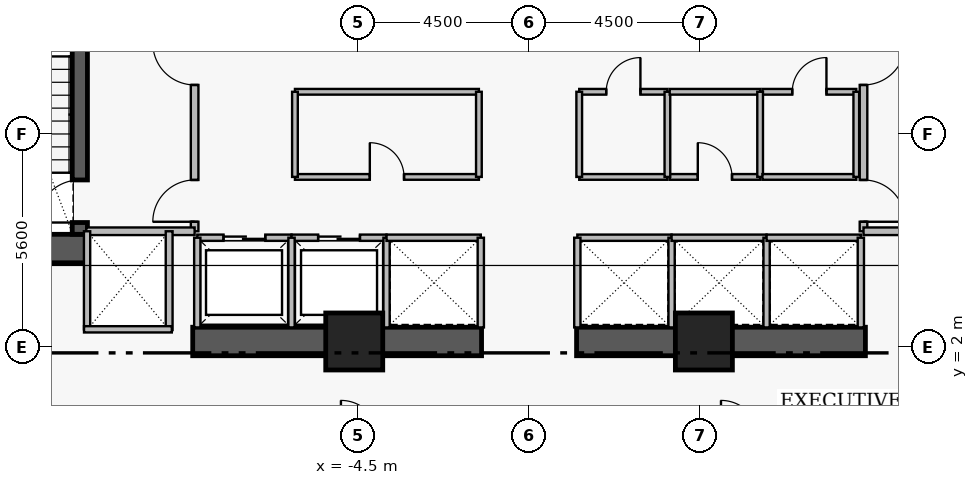
"""IFC4 building model, lengths in metres.
Left out: names, types, materials, properties, quantities, classifications, styles, units other than length and angle.
Written with IfcOpenShell. Run it as: python <this file> out.ifc"""

import sys

from ifc_helpers import new_model, si_unit, direction, frame, frame_2d, origin, origin_2d, place, context, subcontext, project, spatial, rectangle, extrude, element, fill, save


model = new_model("IFC4")
c1 = context("Model", 3, precision=1e-05, world=origin(), true_north=direction((0.0, 1.0)))
c2 = subcontext(c1, "Body", "Model", "MODEL_VIEW")
j1 = project(units=[si_unit("LENGTHUNIT", "METRE"), si_unit("PLANEANGLEUNIT", "RADIAN")], contexts=[c1])
p1 = place(None, origin())
s1 = spatial("IfcSite", under=j1, at=p1, CompositionType="ELEMENT")
p2 = place(p1, origin())
s2 = spatial("IfcBuilding", under=s1, at=p2, CompositionType="ELEMENT")
p3 = place(p2, frame((0.0, 0.0, 143.1)))
s3 = spatial("IfcBuildingStorey", under=s2, at=p3, CompositionType="ELEMENT", Elevation=143.1)
p4 = place(p3, frame((-16.16, 4.595, 0.0), z_axis=(0.0, 0.0, 1.0), x_axis=(1.0, 0.0, 0.0)))
e1 = element("IfcWall", 1, at=p4, inside=s3, PredefinedType="SHEAR", context=c2, shape_type="SweptSolid", body=[
    extrude(rectangle(XDim=4.56, YDim=0.75, at=frame_2d((2.28, 0.0))), origin(), (0.0, 0.0, 1.0), 3.46),
])
for number, where, z_axis, x_axis in (
    (2, (-8.85, 2.15, 0.0), (0.0, 0.0, 1.0), (1.0, 0.0, 0.0)),
    (3, (1.25, 2.15, 0.0), (0.0, 0.0, 1.0), (1.0, 0.0, 0.0)),
):
    element("IfcWall", number, at=place(p3, frame(where, z_axis=z_axis, x_axis=x_axis)), inside=s3, PredefinedType="SHEAR", context=c2, shape_type="SweptSolid", body=[
        extrude(rectangle(XDim=7.6, YDim=0.75, at=frame_2d((3.8, 0.0))), origin(), (0.0, 0.0, 1.0), 3.43),
    ])
p5 = place(p3, frame((-11.82, 4.97, 0.0), z_axis=(0.0, 0.0, 1.0), x_axis=(0.0, 1.0, 0.0)))
e4 = element("IfcWall", 4, at=p5, inside=s3, PredefinedType="SHEAR", context=c2, shape_type="SweptSolid", body=[
    extrude(rectangle(XDim=8.96, YDim=0.4, at=frame_2d((4.48, 0.0))), origin(), (0.0, 0.0, 1.0), 3.46),
])
p6 = place(p5, frame((0.31, 0.0, 0.0)))
e5 = element("IfcOpeningElement", 5, at=p6, cuts=e4, PredefinedType="OPENING", context=c2, shape_type="SweptSolid", body=[
    extrude(rectangle(XDim=1.12, YDim=2.22, at=frame_2d((0.56, 1.11))), frame((0.0, 0.21, 0.0), z_axis=(0.0, -1.0, 0.0), x_axis=(1.0, 0.0, 0.0)), (0.0, 0.0, 1.0), 0.42),
])
for number, where, z_axis, x_axis in (
    (6, (-4.6, 2.15, 0.0), (0.0, 0.0, 1.0), (1.0, 0.0, 0.0)),
    (7, (4.6, 2.15, 0.0), (0.0, 0.0, 1.0), (1.0, 0.0, 0.0)),
):
    element("IfcColumn", number, at=place(p3, frame(where, z_axis=z_axis, x_axis=x_axis)), inside=s3, PredefinedType="COLUMN", context=c2, shape_type="SweptSolid", body=[
        extrude(rectangle(XDim=1.5, YDim=1.5, at=origin_2d()), origin(), (0.0, 0.0, 1.0), 3.65),
    ])
p7 = place(p3, frame((-8.8, 5.05, 0.0), z_axis=(0.0, 0.0, 1.0), x_axis=(0.0, 1.0, 0.0)))
e8 = element("IfcWall", 8, at=p7, inside=s3, PredefinedType="PARTITIONING", context=c2, shape_type="SweptSolid", body=[
    extrude(rectangle(XDim=6.1, YDim=0.2, at=frame_2d((3.05, 0.0))), origin(), (0.0, 0.0, 1.0), 3.43),
])
p8 = place(p7, frame((0.25, 0.0, 0.0)))
e9 = element("IfcOpeningElement", 9, at=p8, cuts=e8, PredefinedType="OPENING", context=c2, shape_type="SweptSolid", body=[
    extrude(rectangle(XDim=1.1, YDim=2.2, at=frame_2d((0.55, 1.1))), frame((0.0, 0.11, 0.0), z_axis=(0.0, -1.0, 0.0), x_axis=(1.0, 0.0, 0.0)), (0.0, 0.0, 1.0), 0.22),
])
p9 = place(p7, frame((3.85, 0.0, 0.0)))
e10 = element("IfcOpeningElement", 10, at=p9, cuts=e8, PredefinedType="OPENING", context=c2, shape_type="SweptSolid", body=[
    extrude(rectangle(XDim=1.1, YDim=2.2, at=frame_2d((0.55, 1.1))), frame((0.0, 0.11, 0.0), z_axis=(0.0, -1.0, 0.0), x_axis=(1.0, 0.0, 0.0)), (0.0, 0.0, 1.0), 0.22),
])
p10 = place(p3, frame((8.8, 11.15, 0.0), z_axis=(0.0, 0.0, 1.0), x_axis=(0.0, -1.0, 0.0)))
e11 = element("IfcWall", 11, at=p10, inside=s3, PredefinedType="PARTITIONING", context=c2, shape_type="SweptSolid", body=[
    extrude(rectangle(XDim=6.1, YDim=0.2, at=frame_2d((3.05, 0.0))), origin(), (0.0, 0.0, 1.0), 3.43),
])
p11 = place(p10, frame((1.15, 0.0, 0.0)))
e12 = element("IfcOpeningElement", 12, at=p11, cuts=e11, PredefinedType="OPENING", context=c2, shape_type="SweptSolid", body=[
    extrude(rectangle(XDim=1.1, YDim=2.2, at=frame_2d((0.55, 1.1))), frame((0.0, 0.11, 0.0), z_axis=(0.0, -1.0, 0.0), x_axis=(1.0, 0.0, 0.0)), (0.0, 0.0, 1.0), 0.22),
])
p12 = place(p10, frame((4.75, 0.0, 0.0)))
e13 = element("IfcOpeningElement", 13, at=p12, cuts=e11, PredefinedType="OPENING", context=c2, shape_type="SweptSolid", body=[
    extrude(rectangle(XDim=1.1, YDim=2.2, at=frame_2d((0.55, 1.1))), frame((0.0, 0.11, 0.0), z_axis=(0.0, -1.0, 0.0), x_axis=(1.0, 0.0, 0.0)), (0.0, 0.0, 1.0), 0.22),
])
p13 = place(p3, frame((-8.73, 4.88, 0.0), z_axis=(0.0, 0.0, 1.0), x_axis=(1.0, 0.0, 0.0)))
e14 = element("IfcWall", 14, at=p13, inside=s3, PredefinedType="PARTITIONING", context=c2, shape_type="SweptSolid", body=[
    extrude(rectangle(XDim=2.48, YDim=0.165, at=frame_2d((1.24, 0.0))), origin(), (0.0, 0.0, 1.0), 3.43),
])
p14 = place(p13, frame((0.69, 0.0, 0.0)))
e15 = element("IfcOpeningElement", 15, at=p14, cuts=e14, PredefinedType="OPENING", context=c2, shape_type="SweptSolid", body=[
    extrude(rectangle(XDim=1.1, YDim=2.25, at=frame_2d((0.55, 1.125))), frame((0.0, 0.093, 0.0), z_axis=(0.0, -1.0, 0.0), x_axis=(1.0, 0.0, 0.0)), (0.0, 0.0, 1.0), 0.185),
])
p15 = place(p3, frame((-6.25, 4.88, 0.0), z_axis=(0.0, 0.0, 1.0), x_axis=(1.0, 0.0, 0.0)))
e16 = element("IfcWall", 16, at=p15, inside=s3, PredefinedType="PARTITIONING", context=c2, shape_type="SweptSolid", body=[
    extrude(rectangle(XDim=2.5, YDim=0.165, at=frame_2d((1.25, 0.0))), origin(), (0.0, 0.0, 1.0), 3.43),
])
p16 = place(p15, frame((0.7, 0.0, 0.0)))
e17 = element("IfcOpeningElement", 17, at=p16, cuts=e16, PredefinedType="OPENING", context=c2, shape_type="SweptSolid", body=[
    extrude(rectangle(XDim=1.1, YDim=2.25, at=frame_2d((0.55, 1.125))), frame((0.0, 0.093, 0.0), z_axis=(0.0, -1.0, 0.0), x_axis=(1.0, 0.0, 0.0)), (0.0, 0.0, 1.0), 0.185),
])
p17 = place(p3, frame((-6.16, 6.48, 0.0), z_axis=(0.0, 0.0, 1.0), x_axis=(1.0, 0.0, 0.0)))
e18 = element("IfcWall", 18, at=p17, inside=s3, PredefinedType="PARTITIONING", context=c2, shape_type="SweptSolid", body=[
    extrude(rectangle(XDim=4.84, YDim=0.15, at=frame_2d((2.42, 0.0))), origin(), (0.0, 0.0, 1.0), 3.43),
])
p18 = place(p17, frame((1.97, 0.0, 0.0)))
e19 = element("IfcOpeningElement", 19, at=p18, cuts=e18, PredefinedType="OPENING", context=c2, shape_type="SweptSolid", body=[
    extrude(rectangle(XDim=0.9, YDim=2.15, at=frame_2d((0.45, 1.075))), frame((0.0, 0.085, 0.0), z_axis=(0.0, -1.0, 0.0), x_axis=(1.0, 0.0, 0.0)), (0.0, 0.0, 1.0), 0.17),
])
p19 = place(p3, frame((1.32, 8.72, 0.0), z_axis=(0.0, 0.0, 1.0), x_axis=(1.0, 0.0, 0.0)))
e20 = element("IfcWall", 20, at=p19, inside=s3, PredefinedType="PARTITIONING", context=c2, shape_type="SweptSolid", body=[
    extrude(rectangle(XDim=2.32, YDim=0.15, at=frame_2d((1.16, 0.0))), origin(), (0.0, 0.0, 1.0), 3.43),
])
p20 = place(p19, frame((0.71, 0.0, 0.0)))
e21 = element("IfcOpeningElement", 21, at=p20, cuts=e20, PredefinedType="OPENING", context=c2, shape_type="SweptSolid", body=[
    extrude(rectangle(XDim=0.9, YDim=2.15, at=frame_2d((0.45, 1.075))), frame((0.0, 0.085, 0.0), z_axis=(0.0, -1.0, 0.0), x_axis=(1.0, 0.0, 0.0)), (0.0, 0.0, 1.0), 0.17),
])
p21 = place(p3, frame((3.7, 6.48, 0.0), z_axis=(0.0, 0.0, 1.0), x_axis=(1.0, 0.0, 0.0)))
e22 = element("IfcWall", 22, at=p21, inside=s3, PredefinedType="PARTITIONING", context=c2, shape_type="SweptSolid", body=[
    extrude(rectangle(XDim=2.38, YDim=0.15, at=frame_2d((1.19, 0.0))), origin(), (0.0, 0.0, 1.0), 3.43),
])
p22 = place(p21, frame((0.74, 0.0, 0.0)))
e23 = element("IfcOpeningElement", 23, at=p22, cuts=e22, PredefinedType="OPENING", context=c2, shape_type="SweptSolid", body=[
    extrude(rectangle(XDim=0.9, YDim=2.15, at=frame_2d((0.45, 1.075))), frame((0.0, 0.085, 0.0), z_axis=(0.0, -1.0, 0.0), x_axis=(1.0, 0.0, 0.0)), (0.0, 0.0, 1.0), 0.17),
])
p23 = place(p3, frame((6.14, 8.72, 0.0), z_axis=(0.0, 0.0, 1.0), x_axis=(1.0, 0.0, 0.0)))
e24 = element("IfcWall", 24, at=p23, inside=s3, PredefinedType="PARTITIONING", context=c2, shape_type="SweptSolid", body=[
    extrude(rectangle(XDim=2.47, YDim=0.15, at=frame_2d((1.235, 0.0))), origin(), (0.0, 0.0, 1.0), 3.43),
])
p24 = place(p23, frame((0.785, 0.0, 0.0)))
e25 = element("IfcOpeningElement", 25, at=p24, cuts=e24, PredefinedType="OPENING", context=c2, shape_type="SweptSolid", body=[
    extrude(rectangle(XDim=0.9, YDim=2.15, at=frame_2d((0.45, 1.075))), frame((0.0, 0.085, 0.0), z_axis=(0.0, -1.0, 0.0), x_axis=(1.0, 0.0, 0.0)), (0.0, 0.0, 1.0), 0.17),
])
for number, where, z_axis, x_axis in (
    (26, (-11.65, 5.05, 0.0), (0.0, 0.0, 1.0), (1.0, 0.0, 0.0)),
    (27, (8.8, 5.05, 0.0), (0.0, 0.0, 1.0), (1.0, 0.0, 0.0)),
):
    element("IfcWall", number, at=place(p3, frame(where, z_axis=z_axis, x_axis=x_axis)), inside=s3, PredefinedType="PARTITIONING", context=c2, shape_type="SweptSolid", body=[
        extrude(rectangle(XDim=2.85, YDim=0.2, at=frame_2d((1.425, 0.0))), origin(), (0.0, 0.0, 1.0), 3.43),
    ])
for number, where, z_axis, x_axis in (
    (28, (-8.73, 2.52, 0.0), (0.0, 0.0, 1.0), (0.0, 1.0, 0.0)),
    (29, (-6.25, 2.52, 0.0), (0.0, 0.0, 1.0), (0.0, 1.0, 0.0)),
    (30, (-3.75, 2.52, 0.0), (0.0, 0.0, 1.0), (0.0, 1.0, 0.0)),
):
    element("IfcWall", number, at=place(p3, frame(where, z_axis=z_axis, x_axis=x_axis)), inside=s3, PredefinedType="PARTITIONING", context=c2, shape_type="SweptSolid", body=[
        extrude(rectangle(XDim=2.36, YDim=0.165, at=frame_2d((1.18, 0.0))), origin(), (0.0, 0.0, 1.0), 3.43),
    ])
p25 = place(p3, frame((-3.75, 4.88, 0.0), z_axis=(0.0, 0.0, 1.0), x_axis=(1.0, 0.0, 0.0)))
e31 = element("IfcWall", 31, at=p25, inside=s3, PredefinedType="PARTITIONING", context=c2, shape_type="SweptSolid", body=[
    extrude(rectangle(XDim=2.48, YDim=0.165, at=frame_2d((1.24, 0.0))), origin(), (0.0, 0.0, 1.0), 3.43),
])
p26 = place(p3, frame((-1.27, 2.52, 0.0), z_axis=(0.0, 0.0, 1.0), x_axis=(0.0, 1.0, 0.0)))
e32 = element("IfcWall", 32, at=p26, inside=s3, PredefinedType="PARTITIONING", context=c2, shape_type="SweptSolid", body=[
    extrude(rectangle(XDim=2.36, YDim=0.165, at=frame_2d((1.18, 0.0))), origin(), (0.0, 0.0, 1.0), 3.43),
])
p27 = place(p3, frame((1.27, 4.88, 0.0), z_axis=(0.0, 0.0, 1.0), x_axis=(1.0, 0.0, 0.0)))
e33 = element("IfcWall", 33, at=p27, inside=s3, PredefinedType="PARTITIONING", context=c2, shape_type="SweptSolid", body=[
    extrude(rectangle(XDim=2.48, YDim=0.165, at=frame_2d((1.24, 0.0))), origin(), (0.0, 0.0, 1.0), 3.43),
])
for number, where, z_axis, x_axis in (
    (34, (1.27, 2.52, 0.0), (0.0, 0.0, 1.0), (0.0, 1.0, 0.0)),
    (35, (3.75, 2.52, 0.0), (0.0, 0.0, 1.0), (0.0, 1.0, 0.0)),
):
    element("IfcWall", number, at=place(p3, frame(where, z_axis=z_axis, x_axis=x_axis)), inside=s3, PredefinedType="PARTITIONING", context=c2, shape_type="SweptSolid", body=[
        extrude(rectangle(XDim=2.36, YDim=0.165, at=frame_2d((1.18, 0.0))), origin(), (0.0, 0.0, 1.0), 3.43),
    ])
p28 = place(p3, frame((3.75, 4.88, 0.0), z_axis=(0.0, 0.0, 1.0), x_axis=(1.0, 0.0, 0.0)))
e36 = element("IfcWall", 36, at=p28, inside=s3, PredefinedType="PARTITIONING", context=c2, shape_type="SweptSolid", body=[
    extrude(rectangle(XDim=2.5, YDim=0.165, at=frame_2d((1.25, 0.0))), origin(), (0.0, 0.0, 1.0), 3.43),
])
p29 = place(p3, frame((6.25, 2.52, 0.0), z_axis=(0.0, 0.0, 1.0), x_axis=(0.0, 1.0, 0.0)))
e37 = element("IfcWall", 37, at=p29, inside=s3, PredefinedType="PARTITIONING", context=c2, shape_type="SweptSolid", body=[
    extrude(rectangle(XDim=2.36, YDim=0.165, at=frame_2d((1.18, 0.0))), origin(), (0.0, 0.0, 1.0), 3.43),
])
p30 = place(p3, frame((6.25, 4.88, 0.0), z_axis=(0.0, 0.0, 1.0), x_axis=(1.0, 0.0, 0.0)))
e38 = element("IfcWall", 38, at=p30, inside=s3, PredefinedType="PARTITIONING", context=c2, shape_type="SweptSolid", body=[
    extrude(rectangle(XDim=2.48, YDim=0.165, at=frame_2d((1.24, 0.0))), origin(), (0.0, 0.0, 1.0), 3.43),
])
p31 = place(p3, frame((8.73, 2.52, 0.0), z_axis=(0.0, 0.0, 1.0), x_axis=(0.0, 1.0, 0.0)))
e39 = element("IfcWall", 39, at=p31, inside=s3, PredefinedType="PARTITIONING", context=c2, shape_type="SweptSolid", body=[
    extrude(rectangle(XDim=2.36, YDim=0.165, at=frame_2d((1.18, 0.0))), origin(), (0.0, 0.0, 1.0), 3.43),
])
p32 = place(p3, frame((-9.47, 2.45, 0.0), z_axis=(0.0, 0.0, 1.0), x_axis=(0.0, 1.0, 0.0)))
e40 = element("IfcWall", 40, at=p32, inside=s3, PredefinedType="PARTITIONING", context=c2, shape_type="SweptSolid", body=[
    extrude(rectangle(XDim=2.6, YDim=0.18, at=frame_2d((1.3, 0.0))), origin(), (0.0, 0.0, 1.0), 3.43),
])
p33 = place(p3, frame((-11.63, 2.47, 0.0), z_axis=(0.0, 0.0, 1.0), x_axis=(0.0, 1.0, 0.0)))
e41 = element("IfcWall", 41, at=p33, inside=s3, PredefinedType="PARTITIONING", context=c2, shape_type="SweptSolid", body=[
    extrude(rectangle(XDim=2.58, YDim=0.165, at=frame_2d((1.29, 0.0))), origin(), (0.0, 0.0, 1.0), 3.43),
])
p34 = place(p3, frame((-11.71, 2.47, 0.0), z_axis=(0.0, 0.0, 1.0), x_axis=(1.0, 0.0, 0.0)))
e42 = element("IfcWall", 42, at=p34, inside=s3, PredefinedType="PARTITIONING", context=c2, shape_type="SweptSolid", body=[
    extrude(rectangle(XDim=2.31, YDim=0.165, at=frame_2d((1.155, 0.0))), origin(), (0.0, 0.0, 1.0), 2.03),
])
p35 = place(p3, frame((-6.16, 8.72, 0.0), z_axis=(0.0, 0.0, 1.0), x_axis=(1.0, 0.0, 0.0)))
e43 = element("IfcWall", 43, at=p35, inside=s3, PredefinedType="PARTITIONING", context=c2, shape_type="SweptSolid", body=[
    extrude(rectangle(XDim=4.84, YDim=0.15, at=frame_2d((2.42, 0.0))), origin(), (0.0, 0.0, 1.0), 3.43),
])
for number, where, z_axis, x_axis in (
    (44, (-6.16, 6.48, 0.0), (0.0, 0.0, 1.0), (0.0, 1.0, 0.0)),
    (45, (-1.32, 6.48, 0.0), (0.0, 0.0, 1.0), (0.0, 1.0, 0.0)),
):
    element("IfcWall", number, at=place(p3, frame(where, z_axis=z_axis, x_axis=x_axis)), inside=s3, PredefinedType="PARTITIONING", context=c2, shape_type="SweptSolid", body=[
        extrude(rectangle(XDim=2.24, YDim=0.15, at=frame_2d((1.12, 0.0))), origin(), (0.0, 0.0, 1.0), 3.43),
    ])
p36 = place(p3, frame((1.32, 6.48, 0.0), z_axis=(0.0, 0.0, 1.0), x_axis=(1.0, 0.0, 0.0)))
e46 = element("IfcWall", 46, at=p36, inside=s3, PredefinedType="PARTITIONING", context=c2, shape_type="SweptSolid", body=[
    extrude(rectangle(XDim=2.32, YDim=0.15, at=frame_2d((1.16, 0.0))), origin(), (0.0, 0.0, 1.0), 3.43),
])
for number, where, z_axis, x_axis in (
    (47, (1.32, 6.48, 0.0), (0.0, 0.0, 1.0), (0.0, 1.0, 0.0)),
    (48, (3.64, 6.48, 0.0), (0.0, 0.0, 1.0), (0.0, 1.0, 0.0)),
):
    element("IfcWall", number, at=place(p3, frame(where, z_axis=z_axis, x_axis=x_axis)), inside=s3, PredefinedType="PARTITIONING", context=c2, shape_type="SweptSolid", body=[
        extrude(rectangle(XDim=2.24, YDim=0.15, at=frame_2d((1.12, 0.0))), origin(), (0.0, 0.0, 1.0), 3.43),
    ])
p37 = place(p3, frame((3.7, 8.72, 0.0), z_axis=(0.0, 0.0, 1.0), x_axis=(1.0, 0.0, 0.0)))
e49 = element("IfcWall", 49, at=p37, inside=s3, PredefinedType="PARTITIONING", context=c2, shape_type="SweptSolid", body=[
    extrude(rectangle(XDim=2.38, YDim=0.15, at=frame_2d((1.19, 0.0))), origin(), (0.0, 0.0, 1.0), 3.43),
])
p38 = place(p3, frame((6.08, 6.48, 0.0), z_axis=(0.0, 0.0, 1.0), x_axis=(0.0, 1.0, 0.0)))
e50 = element("IfcWall", 50, at=p38, inside=s3, PredefinedType="PARTITIONING", context=c2, shape_type="SweptSolid", body=[
    extrude(rectangle(XDim=2.24, YDim=0.15, at=frame_2d((1.12, 0.0))), origin(), (0.0, 0.0, 1.0), 3.43),
])
p39 = place(p3, frame((6.14, 6.48, 0.0), z_axis=(0.0, 0.0, 1.0), x_axis=(1.0, 0.0, 0.0)))
e51 = element("IfcWall", 51, at=p39, inside=s3, PredefinedType="PARTITIONING", context=c2, shape_type="SweptSolid", body=[
    extrude(rectangle(XDim=2.47, YDim=0.15, at=frame_2d((1.235, 0.0))), origin(), (0.0, 0.0, 1.0), 3.43),
])
p40 = place(p3, frame((8.61, 6.48, 0.0), z_axis=(0.0, 0.0, 1.0), x_axis=(0.0, 1.0, 0.0)))
e52 = element("IfcWall", 52, at=p40, inside=s3, PredefinedType="PARTITIONING", context=c2, shape_type="SweptSolid", body=[
    extrude(rectangle(XDim=2.24, YDim=0.15, at=frame_2d((1.12, 0.0))), origin(), (0.0, 0.0, 1.0), 3.43),
])
p41 = place(p6, origin())
e53 = element("IfcDoor", 53, at=p41, inside=s3, OperationType="SINGLE_SWING_LEFT", PredefinedType="DOOR", context=c2, shape_type="SweptSolid", body=[
    extrude(rectangle(XDim=1.12, YDim=2.22, at=frame_2d((0.56, 1.11))), frame((0.0, 0.025, 0.0), z_axis=(0.0, -1.0, 0.0), x_axis=(1.0, 0.0, 0.0)), (0.0, 0.0, 1.0), 0.05),
])
fill(e5, e53)
p42 = place(p8, origin())
e54 = element("IfcDoor", 54, at=p42, inside=s3, OperationType="SINGLE_SWING_LEFT", PredefinedType="DOOR", context=c2, shape_type="SweptSolid", body=[
    extrude(rectangle(XDim=1.1, YDim=2.2, at=frame_2d((0.55, 1.1))), frame((0.0, 0.025, 0.0), z_axis=(0.0, -1.0, 0.0), x_axis=(1.0, 0.0, 0.0)), (0.0, 0.0, 1.0), 0.05),
])
fill(e9, e54)
p43 = place(p9, origin())
e55 = element("IfcDoor", 55, at=p43, inside=s3, OperationType="SINGLE_SWING_RIGHT", PredefinedType="DOOR", context=c2, shape_type="SweptSolid", body=[
    extrude(rectangle(XDim=1.1, YDim=2.2, at=frame_2d((0.55, 1.1))), frame((0.0, 0.025, 0.0), z_axis=(0.0, -1.0, 0.0), x_axis=(1.0, 0.0, 0.0)), (0.0, 0.0, 1.0), 0.05),
])
fill(e10, e55)
p44 = place(p11, origin())
e56 = element("IfcDoor", 56, at=p44, inside=s3, OperationType="SINGLE_SWING_LEFT", PredefinedType="DOOR", context=c2, shape_type="SweptSolid", body=[
    extrude(rectangle(XDim=1.1, YDim=2.2, at=frame_2d((0.55, 1.1))), frame((0.0, 0.025, 0.0), z_axis=(0.0, -1.0, 0.0), x_axis=(1.0, 0.0, 0.0)), (0.0, 0.0, 1.0), 0.05),
])
fill(e12, e56)
p45 = place(p12, origin())
e57 = element("IfcDoor", 57, at=p45, inside=s3, OperationType="SINGLE_SWING_RIGHT", PredefinedType="DOOR", context=c2, shape_type="SweptSolid", body=[
    extrude(rectangle(XDim=1.1, YDim=2.2, at=frame_2d((0.55, 1.1))), frame((0.0, 0.025, 0.0), z_axis=(0.0, -1.0, 0.0), x_axis=(1.0, 0.0, 0.0)), (0.0, 0.0, 1.0), 0.05),
])
fill(e13, e57)
p46 = place(p14, origin())
e58 = element("IfcDoor", 58, at=p46, inside=s3, OperationType="SLIDING_TO_LEFT", PredefinedType="DOOR", context=c2, shape_type="SweptSolid", body=[
    extrude(rectangle(XDim=1.1, YDim=2.25, at=frame_2d((0.55, 1.125))), frame((0.0, 0.025, 0.0), z_axis=(0.0, -1.0, 0.0), x_axis=(1.0, 0.0, 0.0)), (0.0, 0.0, 1.0), 0.05),
])
fill(e15, e58)
p47 = place(p16, origin())
e59 = element("IfcDoor", 59, at=p47, inside=s3, OperationType="SLIDING_TO_LEFT", PredefinedType="DOOR", context=c2, shape_type="SweptSolid", body=[
    extrude(rectangle(XDim=1.1, YDim=2.25, at=frame_2d((0.55, 1.125))), frame((0.0, 0.025, 0.0), z_axis=(0.0, -1.0, 0.0), x_axis=(1.0, 0.0, 0.0)), (0.0, 0.0, 1.0), 0.05),
])
fill(e17, e59)
p48 = place(p18, origin())
e60 = element("IfcDoor", 60, at=p48, inside=s3, OperationType="SINGLE_SWING_LEFT", PredefinedType="DOOR", context=c2, shape_type="SweptSolid", body=[
    extrude(rectangle(XDim=0.9, YDim=2.15, at=frame_2d((0.45, 1.075))), frame((0.0, 0.025, 0.0), z_axis=(0.0, -1.0, 0.0), x_axis=(1.0, 0.0, 0.0)), (0.0, 0.0, 1.0), 0.05),
])
fill(e19, e60)
p49 = place(p20, origin())
e61 = element("IfcDoor", 61, at=p49, inside=s3, OperationType="SINGLE_SWING_RIGHT", PredefinedType="DOOR", context=c2, shape_type="SweptSolid", body=[
    extrude(rectangle(XDim=0.9, YDim=2.15, at=frame_2d((0.45, 1.075))), frame((0.0, 0.025, 0.0), z_axis=(0.0, -1.0, 0.0), x_axis=(1.0, 0.0, 0.0)), (0.0, 0.0, 1.0), 0.05),
])
fill(e21, e61)
p50 = place(p22, origin())
e62 = element("IfcDoor", 62, at=p50, inside=s3, OperationType="SINGLE_SWING_LEFT", PredefinedType="DOOR", context=c2, shape_type="SweptSolid", body=[
    extrude(rectangle(XDim=0.9, YDim=2.15, at=frame_2d((0.45, 1.075))), frame((0.0, 0.025, 0.0), z_axis=(0.0, -1.0, 0.0), x_axis=(1.0, 0.0, 0.0)), (0.0, 0.0, 1.0), 0.05),
])
fill(e23, e62)
p51 = place(p24, origin())
e63 = element("IfcDoor", 63, at=p51, inside=s3, OperationType="SINGLE_SWING_RIGHT", PredefinedType="DOOR", context=c2, shape_type="SweptSolid", body=[
    extrude(rectangle(XDim=0.9, YDim=2.15, at=frame_2d((0.45, 1.075))), frame((0.0, 0.025, 0.0), z_axis=(0.0, -1.0, 0.0), x_axis=(1.0, 0.0, 0.0)), (0.0, 0.0, 1.0), 0.05),
])
fill(e25, e63)
save(model, sys.argv[1])
